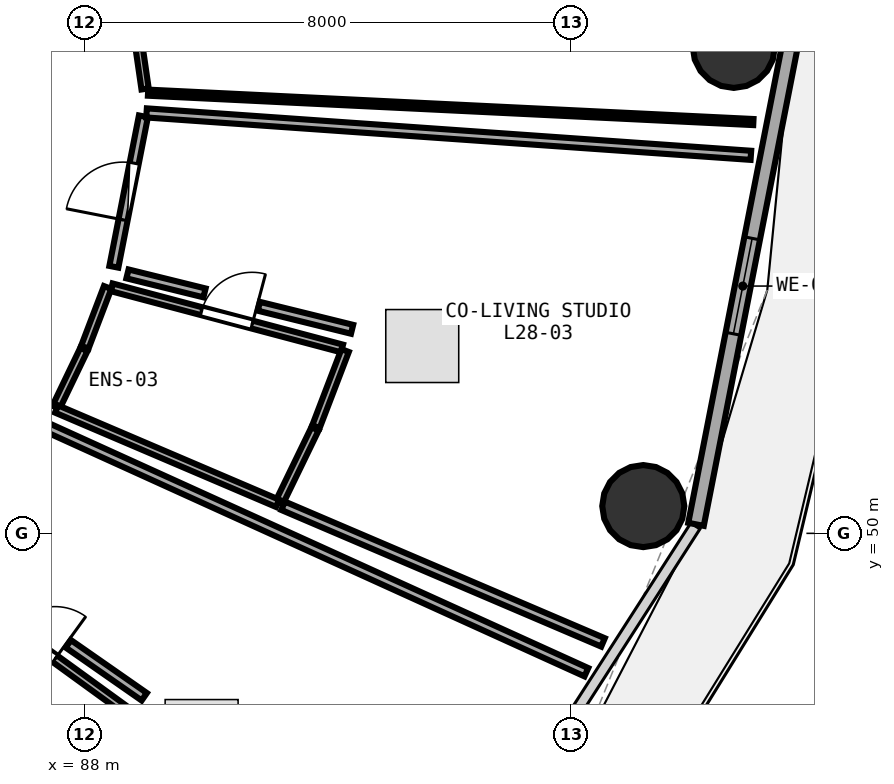
"""IFC4 building model, lengths in metres.
Left out: names, types, materials, properties, quantities, classifications, styles, units other than length and angle.
Written with IfcOpenShell. Run it as: python <this file> out.ifc"""

import sys

from ifc_helpers import new_model, si_unit, direction, frame, frame_2d, origin, origin_2d, place, context, subcontext, project, spatial, rectangle, circle, extrude, element, fill, save


model = new_model("IFC4")
c1 = context("Model", 3, precision=1e-05, world=origin(), true_north=direction((0.0, 1.0)))
c2 = subcontext(c1, "Body", "Model", "MODEL_VIEW")
j1 = project(units=[si_unit("LENGTHUNIT", "METRE"), si_unit("PLANEANGLEUNIT", "RADIAN")], contexts=[c1])
p1 = place(None, origin())
s1 = spatial("IfcSite", under=j1, at=p1, CompositionType="ELEMENT")
p2 = place(p1, origin())
s2 = spatial("IfcBuilding", under=s1, at=p2, CompositionType="ELEMENT")
p3 = place(p2, frame((0.0, 0.0, 110.1)))
s3 = spatial("IfcBuildingStorey", under=s2, at=p3, CompositionType="ELEMENT", Elevation=110.1)
for number, where, z_axis, x_axis in (
    (1, (98.68, 58.0, 0.0), (0.0, 0.0, 1.0), (1.0, 0.0, 0.0)),
    (2, (97.192, 50.448, 0.0), (0.0, 0.0, 1.0), (1.0, 0.0, 0.0)),
):
    element("IfcColumn", number, at=place(p3, frame(where, z_axis=z_axis, x_axis=x_axis)), inside=s3, PredefinedType="COLUMN", context=c2, shape_type="SweptSolid", body=[
        extrude(circle(Radius=0.675, at=origin_2d()), origin(), (0.0, 0.0, 1.0), 3.75),
    ])
p4 = place(p3, frame((98.059, 50.148, 0.0), z_axis=(0.0, 0.0, 1.0), x_axis=(0.192581843632, 0.981280914674, 0.0)))
e3 = element("IfcWall", 3, at=p4, inside=s3, PredefinedType="SOLIDWALL", context=c2, shape_type="SweptSolid", body=[
    extrude(rectangle(XDim=7.987, YDim=0.26, at=frame_2d((3.993, 0.0))), origin(), (0.0, 0.0, 1.0), 3.475),
])
p5 = place(p4, frame((3.193, 0.0, 0.85)))
e4 = element("IfcOpeningElement", 4, at=p5, cuts=e3, PredefinedType="OPENING", context=c2, shape_type="SweptSolid", body=[
    extrude(rectangle(XDim=1.6, YDim=1.45, at=frame_2d((0.8, 0.725))), frame((0.0, 0.14, 0.0), z_axis=(0.0, -1.0, 0.0), x_axis=(1.0, 0.0, 0.0)), (0.0, 0.0, 1.0), 0.28),
])
p6 = place(p3, frame((85.645, 49.294, 0.0), z_axis=(0.0, 0.0, 1.0), x_axis=(0.809536550173, -0.587069479647, 0.0)))
e5 = element("IfcWall", 5, at=p6, inside=s3, PredefinedType="PLUMBINGWALL", context=c2, shape_type="SweptSolid", body=[
    extrude(rectangle(XDim=3.769, YDim=0.13, at=frame_2d((1.884, 0.0))), origin(), (0.0, 0.0, 1.0), 3.175),
])
p7 = place(p6, frame((1.454, 0.0, 0.0)))
e6 = element("IfcOpeningElement", 6, at=p7, cuts=e5, PredefinedType="OPENING", context=c2, shape_type="SweptSolid", body=[
    extrude(rectangle(XDim=0.86, YDim=2.05, at=frame_2d((0.43, 1.025))), frame((0.0, 0.075, 0.0), z_axis=(0.0, -1.0, 0.0), x_axis=(1.0, 0.0, 0.0)), (0.0, 0.0, 1.0), 0.15),
])
p8 = place(p3, frame((88.447, 54.047, 0.0), z_axis=(0.0, 0.0, 1.0), x_axis=(0.966509259567, -0.25663174233, 0.0)))
e7 = element("IfcWall", 7, at=p8, inside=s3, PredefinedType="PLUMBINGWALL", context=c2, shape_type="SweptSolid", body=[
    extrude(rectangle(XDim=3.921, YDim=0.13, at=frame_2d((1.961, 0.0))), origin(), (0.0, 0.0, 1.0), 3.175),
])
p9 = place(p8, frame((1.531, 0.0, 0.0)))
e8 = element("IfcOpeningElement", 8, at=p9, cuts=e7, PredefinedType="OPENING", context=c2, shape_type="SweptSolid", body=[
    extrude(rectangle(XDim=0.86, YDim=2.05, at=frame_2d((0.43, 1.025))), frame((0.0, 0.075, 0.0), z_axis=(0.0, -1.0, 0.0), x_axis=(1.0, 0.0, 0.0)), (0.0, 0.0, 1.0), 0.15),
])
p10 = place(p3, frame((88.485, 54.384, 0.0), z_axis=(0.0, 0.0, 1.0), x_axis=(0.192670392626, 0.981263532292, 0.0)))
e9 = element("IfcWall", 9, at=p10, inside=s3, PredefinedType="PARTITIONING", context=c2, shape_type="SweptSolid", body=[
    extrude(rectangle(XDim=2.522, YDim=0.15, at=frame_2d((1.261, 0.0))), origin(), (0.0, 0.0, 1.0), 3.48),
])
p11 = place(p10, frame((0.786, 0.0, 0.0)))
e10 = element("IfcOpeningElement", 10, at=p11, cuts=e9, PredefinedType="OPENING", context=c2, shape_type="SweptSolid", body=[
    extrude(rectangle(XDim=0.95, YDim=2.08, at=frame_2d((0.475, 1.04))), frame((0.0, 0.085, 0.0), z_axis=(0.0, -1.0, 0.0), x_axis=(1.0, 0.0, 0.0)), (0.0, 0.0, 1.0), 0.17),
])
p12 = place(p3, frame((88.998, 57.308, 0.0), z_axis=(0.0, 0.0, 1.0), x_axis=(-0.143556297193, 0.989642152263, 0.0)))
e11 = element("IfcWall", 11, at=p12, inside=s3, PredefinedType="PARTITIONING", context=c2, shape_type="SweptSolid", body=[
    extrude(rectangle(XDim=4.93, YDim=0.12, at=frame_2d((2.465, 0.0))), origin(), (0.0, 0.0, 1.0), 2.925),
])
p13 = place(p12, frame((2.015, 0.0, 0.0)))
e12 = element("IfcOpeningElement", 12, at=p13, cuts=e11, PredefinedType="OPENING", context=c2, shape_type="SweptSolid", body=[
    extrude(rectangle(XDim=0.9, YDim=2.08, at=frame_2d((0.45, 1.04))), frame((0.0, 0.07, 0.0), z_axis=(0.0, -1.0, 0.0), x_axis=(1.0, 0.0, 0.0)), (0.0, 0.0, 1.0), 0.14),
])
p14 = place(p3, frame((83.692, 47.532, 0.0), z_axis=(0.0, 0.0, 1.0), x_axis=(0.690037215828, -0.723773887877, 0.0)))
e13 = element("IfcWall", 13, at=p14, inside=s3, PredefinedType="PARTITIONING", context=c2, shape_type="SweptSolid", body=[
    extrude(rectangle(XDim=9.285, YDim=0.15, at=frame_2d((4.642, 0.0))), origin(), (0.0, 0.0, 1.0), 2.975),
])
p15 = place(p3, frame((87.396, 51.739, 0.0), z_axis=(0.0, 0.0, 1.0), x_axis=(0.910573449225, -0.413347303809, 0.0)))
e14 = element("IfcWall", 14, at=p15, inside=s3, PredefinedType="PARTITIONING", context=c2, shape_type="SweptSolid", body=[
    extrude(rectangle(XDim=9.73, YDim=0.15, at=frame_2d((4.865, 0.0))), origin(), (0.0, 0.0, 1.0), 2.925),
])
p16 = place(p3, frame((88.984, 47.313, 0.0), z_axis=(0.0, 0.0, 1.0), x_axis=(-0.820375371548, 0.571825366486, 0.0)))
e15 = element("IfcWall", 15, at=p16, inside=s3, PredefinedType="PARTITIONING", context=c2, shape_type="SweptSolid", body=[
    extrude(rectangle(XDim=1.522, YDim=0.15, at=frame_2d((0.761, 0.0))), origin(), (0.0, 0.0, 1.0), 3.175),
])
p17 = place(p3, frame((87.533, 52.071, 0.0), z_axis=(0.0, 0.0, 1.0), x_axis=(0.433586527714, 0.90111193699, 0.0)))
e16 = element("IfcWall", 16, at=p17, inside=s3, PredefinedType="PLUMBINGWALL", context=c2, shape_type="SweptSolid", body=[
    extrude(rectangle(XDim=1.057, YDim=0.13, at=frame_2d((0.529, 0.0))), origin(), (0.0, 0.0, 1.0), 3.235),
])
p18 = place(p3, frame((88.007, 53.061, 0.0), z_axis=(0.0, 0.0, 1.0), x_axis=(0.356410474394, 0.934329478151, 0.0)))
e17 = element("IfcWall", 17, at=p18, inside=s3, PredefinedType="PLUMBINGWALL", context=c2, shape_type="SweptSolid", body=[
    extrude(rectangle(XDim=1.052, YDim=0.13, at=frame_2d((0.526, 0.0))), origin(), (0.0, 0.0, 1.0), 3.235),
])
p19 = place(p3, frame((92.288, 53.006, 0.0), z_axis=(0.0, 0.0, 1.0), x_axis=(-0.357880433235, -0.933767420457, 0.0)))
e18 = element("IfcWall", 18, at=p19, inside=s3, PredefinedType="PLUMBINGWALL", context=c2, shape_type="SweptSolid", body=[
    extrude(rectangle(XDim=1.341, YDim=0.13, at=frame_2d((0.67, 0.0))), origin(), (0.0, 0.0, 1.0), 3.48),
])
p20 = place(p3, frame((91.792, 51.718, 0.0), z_axis=(0.0, 0.0, 1.0), x_axis=(-0.436251309033, -0.899824869275, 0.0)))
e19 = element("IfcWall", 19, at=p20, inside=s3, PredefinedType="PLUMBINGWALL", context=c2, shape_type="SweptSolid", body=[
    extrude(rectangle(XDim=1.349, YDim=0.13, at=frame_2d((0.675, 0.0))), origin(), (0.0, 0.0, 1.0), 2.925),
])
p21 = place(p3, frame((91.177, 50.494, 0.0), z_axis=(0.0, 0.0, 1.0), x_axis=(-0.919709759256, 0.392598979531, 0.0)))
e20 = element("IfcWall", 20, at=p21, inside=s3, PredefinedType="PLUMBINGWALL", context=c2, shape_type="SweptSolid", body=[
    extrude(rectangle(XDim=3.951, YDim=0.13, at=frame_2d((1.976, 0.0))), origin(), (0.0, 0.0, 1.0), 2.925),
])
p22 = place(p3, frame((89.022, 56.914, 0.0), z_axis=(0.0, 0.0, 1.0), x_axis=(0.997546611002, -0.070005420344, 0.0)))
e21 = element("IfcWall", 21, at=p22, inside=s3, PredefinedType="PARTITIONING", context=c2, shape_type="SweptSolid", body=[
    extrude(rectangle(XDim=9.964, YDim=0.15, at=frame_2d((4.982, 0.0))), origin(), (0.0, 0.0, 1.0), 2.975),
])
p23 = place(p3, frame((96.529, 48.207, 0.0), z_axis=(0.0, 0.0, 1.0), x_axis=(-0.919671747219, 0.392688015308, 0.0)))
e22 = element("IfcWall", 22, at=p23, inside=s3, PredefinedType="PARTITIONING", context=c2, shape_type="SweptSolid", body=[
    extrude(rectangle(XDim=5.721, YDim=0.15, at=frame_2d((2.86, 0.0))), origin(), (0.0, 0.0, 1.0), 2.925),
])
p24 = place(p3, frame((92.402, 53.356, 0.0), z_axis=(0.0, 0.0, 1.0), x_axis=(-0.97090160449, 0.23947875563, 0.0)))
e23 = element("IfcWall", 23, at=p24, inside=s3, PredefinedType="PARTITIONING", context=c2, shape_type="SweptSolid", body=[
    extrude(rectangle(XDim=1.579, YDim=0.15, at=frame_2d((0.79, 0.0))), origin(), (0.0, 0.0, 1.0), 3.175),
])
p25 = place(p3, frame((89.976, 53.954, 0.0), z_axis=(0.0, 0.0, 1.0), x_axis=(-0.97090790697, 0.23945320249, 0.0)))
e24 = element("IfcWall", 24, at=p25, inside=s3, PredefinedType="PARTITIONING", context=c2, shape_type="SweptSolid", body=[
    extrude(rectangle(XDim=1.305, YDim=0.15, at=frame_2d((0.653, 0.0))), origin(), (0.0, 0.0, 1.0), 3.48),
])
p26 = place(p3, frame((99.002, 56.764, 0.0), z_axis=(0.0, 0.0, 1.0), x_axis=(-0.998824271059, 0.048477577742, 0.0)))
e25 = element("IfcWall", 25, at=p26, inside=s3, PredefinedType="PARTITIONING", context=c2, shape_type="SweptSolid", body=[
    extrude(rectangle(XDim=9.967, YDim=0.1, at=frame_2d((4.983, 0.0))), origin(), (0.0, 0.0, 1.0), 2.975),
])
p27 = place(p5, origin())
e26 = element("IfcWindow", 26, at=p27, inside=s3, PartitioningType="SINGLE_PANEL", PredefinedType="WINDOW", context=c2, shape_type="SweptSolid", body=[
    extrude(rectangle(XDim=1.6, YDim=1.45, at=frame_2d((0.8, 0.725))), frame((0.0, 0.03, 0.0), z_axis=(0.0, -1.0, 0.0), x_axis=(1.0, 0.0, 0.0)), (0.0, 0.0, 1.0), 0.06),
])
fill(e4, e26)
p28 = place(p7, origin())
e27 = element("IfcDoor", 27, at=p28, inside=s3, OperationType="SINGLE_SWING_RIGHT", PredefinedType="DOOR", context=c2, shape_type="SweptSolid", body=[
    extrude(rectangle(XDim=0.86, YDim=2.05, at=frame_2d((0.43, 1.025))), frame((0.0, 0.025, 0.0), z_axis=(0.0, -1.0, 0.0), x_axis=(1.0, 0.0, 0.0)), (0.0, 0.0, 1.0), 0.05),
])
fill(e6, e27)
p29 = place(p9, origin())
e28 = element("IfcDoor", 28, at=p29, inside=s3, OperationType="SINGLE_SWING_RIGHT", PredefinedType="DOOR", context=c2, shape_type="SweptSolid", body=[
    extrude(rectangle(XDim=0.86, YDim=2.05, at=frame_2d((0.43, 1.025))), frame((0.0, 0.025, 0.0), z_axis=(0.0, -1.0, 0.0), x_axis=(1.0, 0.0, 0.0)), (0.0, 0.0, 1.0), 0.05),
])
fill(e8, e28)
p30 = place(p11, origin())
e29 = element("IfcDoor", 29, at=p30, inside=s3, OperationType="SINGLE_SWING_LEFT", PredefinedType="DOOR", context=c2, shape_type="SweptSolid", body=[
    extrude(rectangle(XDim=0.95, YDim=2.08, at=frame_2d((0.475, 1.04))), frame((0.0, 0.025, 0.0), z_axis=(0.0, -1.0, 0.0), x_axis=(1.0, 0.0, 0.0)), (0.0, 0.0, 1.0), 0.05),
])
fill(e10, e29)
save(model, sys.argv[1])
